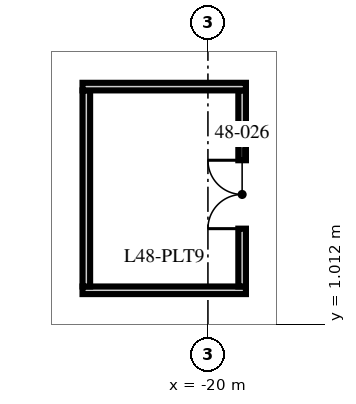
"""IFC4 building model, lengths in metres.
Left out: names, types, materials, properties, quantities, classifications, styles, units other than length and angle.
Written with IfcOpenShell. Run it as: python <this file> out.ifc"""

import sys

from ifc_helpers import new_model, si_unit, direction, frame, frame_2d, origin, origin_2d, place, context, subcontext, project, spatial, rectangle, hollow_rectangle, extrude, element, fill, save


model = new_model("IFC4")
c1 = context("Model", 3, precision=1e-05, world=origin(), true_north=direction((0.0, 1.0)))
c2 = subcontext(c1, "Body", "Model", "MODEL_VIEW")
j1 = project(units=[si_unit("LENGTHUNIT", "METRE"), si_unit("PLANEANGLEUNIT", "RADIAN")], contexts=[c1])
p1 = place(None, origin())
s1 = spatial("IfcSite", under=j1, at=p1, CompositionType="ELEMENT")
p2 = place(p1, origin())
s2 = spatial("IfcBuilding", under=s1, at=p2, CompositionType="ELEMENT")
p3 = place(p2, frame((0.0, 0.0, 192.0)))
s3 = spatial("IfcBuildingStorey", under=s2, at=p3, CompositionType="ELEMENT", Elevation=192.0)
p4 = place(p3, frame((-27.1, 0.0, -0.65), z_axis=(0.334792284074, 0.0, 0.942291953974), x_axis=(0.0, 1.0, 0.0)))
e1 = element("IfcColumn", 1, at=p4, inside=s3, PredefinedType="COLUMN", context=c2, shape_type="SweptSolid", body=[
    extrude(hollow_rectangle(XDim=3.2, YDim=1.8, WallThickness=0.2, at=origin_2d()), origin(), (0.0, 0.0, 1.0), 8.065),
])
p5 = place(p3, frame((-27.1, 9.16, -0.65), z_axis=(0.332991803119, -0.103570687408, 0.937224397765), x_axis=(0.034607128924, 0.994622092871, 0.097617821118)))
e2 = element("IfcColumn", 2, at=p5, inside=s3, PredefinedType="COLUMN", context=c2, shape_type="SweptSolid", body=[
    extrude(hollow_rectangle(XDim=3.2, YDim=1.8, WallThickness=0.2, at=origin_2d()), origin(), (0.0, 0.0, 1.0), 8.109),
])
p6 = place(p3, frame((-23.3, 1.9, 0.0), z_axis=(0.0, 0.0, 1.0), x_axis=(1.0, 0.0, 0.0)))
e3 = element("IfcWall", 3, at=p6, inside=s3, PredefinedType="SOLIDWALL", context=c2, shape_type="SweptSolid", body=[
    extrude(rectangle(XDim=4.3, YDim=0.2, at=frame_2d((2.15, 0.0))), origin(), (0.0, 0.0, 1.0), 7.25),
])
p7 = place(p3, frame((-23.2, 2.0, 0.0), z_axis=(0.0, 0.0, 1.0), x_axis=(0.0, 1.0, 0.0)))
e4 = element("IfcWall", 4, at=p7, inside=s3, PredefinedType="SOLIDWALL", context=c2, shape_type="SweptSolid", body=[
    extrude(rectangle(XDim=5.16, YDim=0.2, at=frame_2d((2.58, 0.0))), origin(), (0.0, 0.0, 1.0), 6.56),
])
p8 = place(p3, frame((-19.1, 2.0, 0.0), z_axis=(0.0, 0.0, 1.0), x_axis=(0.0, 1.0, 0.0)))
e5 = element("IfcWall", 5, at=p8, inside=s3, PredefinedType="SOLIDWALL", context=c2, shape_type="SweptSolid", body=[
    extrude(rectangle(XDim=5.16, YDim=0.2, at=frame_2d((2.58, 0.0))), origin(), (0.0, 0.0, 1.0), 6.56),
])
p9 = place(p8, frame((1.522, 0.0, 0.0)))
e6 = element("IfcOpeningElement", 6, at=p9, cuts=e5, PredefinedType="OPENING", context=c2, shape_type="SweptSolid", body=[
    extrude(rectangle(XDim=1.8, YDim=2.4, at=frame_2d((0.9, 1.2))), frame((0.0, 0.11, 0.0), z_axis=(0.0, -1.0, 0.0), x_axis=(1.0, 0.0, 0.0)), (0.0, 0.0, 1.0), 0.22),
])
p10 = place(p3, frame((-23.3, 7.26, 0.0), z_axis=(0.0, 0.0, 1.0), x_axis=(1.0, 0.0, 0.0)))
e7 = element("IfcWall", 7, at=p10, inside=s3, PredefinedType="SOLIDWALL", context=c2, shape_type="SweptSolid", body=[
    extrude(rectangle(XDim=4.3, YDim=0.2, at=frame_2d((2.15, 0.0))), origin(), (0.0, 0.0, 1.0), 7.25),
])
p11 = place(p9, origin())
e8 = element("IfcDoor", 8, at=p11, inside=s3, OperationType="DOUBLE_DOOR_SINGLE_SWING", PredefinedType="DOOR", context=c2, shape_type="SweptSolid", body=[
    extrude(rectangle(XDim=1.8, YDim=2.4, at=frame_2d((0.9, 1.2))), frame((0.0, 0.025, 0.0), z_axis=(0.0, -1.0, 0.0), x_axis=(1.0, 0.0, 0.0)), (0.0, 0.0, 1.0), 0.05),
])
fill(e6, e8)
save(model, sys.argv[1])
